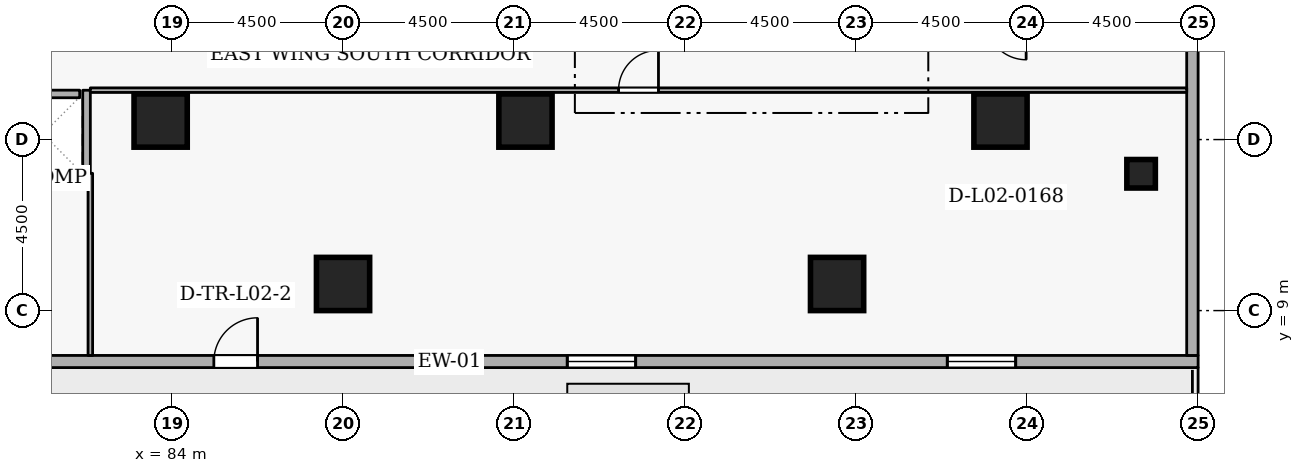
"""IFC4 building model, lengths in metres.
Left out: names, types, materials, properties, quantities, classifications, styles, units other than length and angle.
Written with IfcOpenShell. Run it as: python <this file> out.ifc"""

import sys

from ifc_helpers import new_model, si_unit, direction, frame, frame_2d, origin, origin_2d, place, context, subcontext, project, spatial, rectangle, extrude, element, fill, save


model = new_model("IFC4")
c1 = context("Model", 3, precision=1e-05, world=origin(), true_north=direction((0.0, 1.0)))
c2 = subcontext(c1, "Body", "Model", "MODEL_VIEW")
j1 = project(units=[si_unit("LENGTHUNIT", "METRE"), si_unit("PLANEANGLEUNIT", "RADIAN")], contexts=[c1])
p1 = place(None, origin())
s1 = spatial("IfcSite", under=j1, at=p1, CompositionType="ELEMENT")
p2 = place(p1, origin())
s2 = spatial("IfcBuilding", under=s1, at=p2, CompositionType="ELEMENT")
p3 = place(p2, frame((0.0, 0.0, 9.6)))
s3 = spatial("IfcBuildingStorey", under=s2, at=p3, CompositionType="ELEMENT", Elevation=9.6)
for number, where, z_axis, x_axis in (
    (1, (105.8, 14.0, 0.0), (0.0, 0.0, 1.0), (1.0, 0.0, 0.0)),
    (2, (101.5, 9.7, 0.0), (0.0, 0.0, 1.0), (1.0, 0.0, 0.0)),
    (3, (88.5, 9.7, 0.0), (0.0, 0.0, 1.0), (1.0, 0.0, 0.0)),
    (4, (93.3, 14.0, 0.0), (0.0, 0.0, 1.0), (1.0, 0.0, 0.0)),
    (5, (83.7, 14.0, 0.0), (0.0, 0.0, 1.0), (1.0, 0.0, 0.0)),
):
    element("IfcColumn", number, at=place(p3, frame(where, z_axis=z_axis, x_axis=x_axis)), inside=s3, PredefinedType="COLUMN", context=c2, shape_type="SweptSolid", body=[
        extrude(rectangle(XDim=1.4, YDim=1.4, at=origin_2d()), origin(), (0.0, 0.0, 1.0), 4.5),
    ])
p4 = place(p3, frame((109.5, 12.6, 0.0), z_axis=(0.0, 0.0, 1.0), x_axis=(1.0, 0.0, 0.0)))
e6 = element("IfcColumn", 6, at=p4, inside=s3, PredefinedType="COLUMN", context=c2, shape_type="SweptSolid", body=[
    extrude(rectangle(XDim=0.75, YDim=0.75, at=origin_2d()), origin(), (0.0, 0.0, 1.0), 4.5),
])
p5 = place(p3, frame((71.6, 7.66, 0.0), z_axis=(0.0, 0.0, 1.0), x_axis=(1.0, 0.0, 0.0)))
e7 = element("IfcWall", 7, at=p5, inside=s3, PredefinedType="STANDARD", context=c2, shape_type="SweptSolid", body=[
    extrude(rectangle(XDim=39.4, YDim=0.32, at=frame_2d((19.7, 0.0))), origin(), (0.0, 0.0, 1.0), 3.56),
])
p6 = place(p5, frame((13.5, 0.0, 0.0)))
e8 = element("IfcOpeningElement", 8, at=p6, cuts=e7, PredefinedType="OPENING", context=c2, shape_type="SweptSolid", body=[
    extrude(rectangle(XDim=1.15, YDim=2.1, at=frame_2d((0.575, 1.05))), frame((0.0, 0.17, 0.0), z_axis=(0.0, -1.0, 0.0), x_axis=(1.0, 0.0, 0.0)), (0.0, 0.0, 1.0), 0.34),
])
p7 = place(p5, frame((22.8, 0.0, 0.78)))
e9 = element("IfcOpeningElement", 9, at=p7, cuts=e7, PredefinedType="OPENING", context=c2, shape_type="SweptSolid", body=[
    extrude(rectangle(XDim=1.8, YDim=2.15, at=frame_2d((0.9, 1.075))), frame((0.0, 0.17, 0.0), z_axis=(0.0, -1.0, 0.0), x_axis=(1.0, 0.0, 0.0)), (0.0, 0.0, 1.0), 0.34),
])
p8 = place(p5, frame((32.8, 0.0, 0.78)))
e10 = element("IfcOpeningElement", 10, at=p8, cuts=e7, PredefinedType="OPENING", context=c2, shape_type="SweptSolid", body=[
    extrude(rectangle(XDim=1.8, YDim=2.15, at=frame_2d((0.9, 1.075))), frame((0.0, 0.17, 0.0), z_axis=(0.0, -1.0, 0.0), x_axis=(1.0, 0.0, 0.0)), (0.0, 0.0, 1.0), 0.34),
])
p9 = place(p3, frame((110.85, 7.82, 0.0), z_axis=(0.0, 0.0, 1.0), x_axis=(0.0, 1.0, 0.0)))
e11 = element("IfcWall", 11, at=p9, inside=s3, PredefinedType="STANDARD", context=c2, shape_type="SweptSolid", body=[
    extrude(rectangle(XDim=41.36, YDim=0.3, at=frame_2d((20.68, 0.0))), origin(), (0.0, 0.0, 1.0), 3.56),
])
p10 = place(p3, frame((79.63, 14.7, 0.0), z_axis=(0.0, 0.0, 1.0), x_axis=(1.0, 0.0, 0.0)))
e12 = element("IfcWall", 12, at=p10, inside=s3, PredefinedType="STANDARD", context=c2, shape_type="SweptSolid", body=[
    extrude(rectangle(XDim=1.94, YDim=0.2, at=frame_2d((0.97, 0.0))), origin(), (0.0, 0.0, 1.0), 4.16),
])
p11 = place(p3, frame((79.452, 12.5, 0.0), z_axis=(0.0, 0.0, 1.0), x_axis=(1.0, 0.0, 0.0)))
e13 = element("IfcWall", 13, at=p11, inside=s3, PredefinedType="STANDARD", context=c2, shape_type="SweptSolid", body=[
    extrude(rectangle(XDim=2.296, YDim=0.2, at=frame_2d((1.148, 0.0))), origin(), (0.0, 0.0, 1.0), 4.16),
])
p12 = place(p3, frame((81.75, 12.612, 0.0), z_axis=(0.0, 0.0, 1.0), x_axis=(0.0, 1.0, 0.0)))
e14 = element("IfcWall", 14, at=p12, inside=s3, PredefinedType="STANDARD", context=c2, shape_type="SweptSolid", body=[
    extrude(rectangle(XDim=2.186, YDim=0.2, at=frame_2d((1.093, 0.0))), origin(), (0.0, 0.0, 1.0), 4.16),
])
p13 = place(p3, frame((81.85, 7.82, 0.0), z_axis=(0.0, 0.0, 1.0), x_axis=(0.0, 1.0, 0.0)))
e15 = element("IfcWall", 15, at=p13, inside=s3, PredefinedType="PARTITIONING", context=c2, shape_type="SweptSolid", body=[
    extrude(rectangle(XDim=4.792, YDim=0.12, at=frame_2d((2.396, 0.0))), origin(), (0.0, 0.0, 1.0), 4.16),
])
p14 = place(p3, frame((81.85, 14.8, 0.0), z_axis=(0.0, 0.0, 1.0), x_axis=(1.0, 0.0, 0.0)))
e16 = element("IfcWall", 16, at=p14, inside=s3, PredefinedType="PARTITIONING", context=c2, shape_type="SweptSolid", body=[
    extrude(rectangle(XDim=28.85, YDim=0.12, at=frame_2d((14.425, 0.0))), origin(), (0.0, 0.0, 1.0), 4.16),
])
p15 = place(p14, frame((13.9, 0.0, 0.0)))
e17 = element("IfcOpeningElement", 17, at=p15, cuts=e16, PredefinedType="OPENING", context=c2, shape_type="SweptSolid", body=[
    extrude(rectangle(XDim=1.05, YDim=2.1, at=frame_2d((0.525, 1.05))), frame((0.0, 0.07, 0.0), z_axis=(0.0, -1.0, 0.0), x_axis=(1.0, 0.0, 0.0)), (0.0, 0.0, 1.0), 0.14),
])
p16 = place(p6, origin())
e18 = element("IfcDoor", 18, at=p16, inside=s3, OperationType="SINGLE_SWING_RIGHT", PredefinedType="DOOR", context=c2, shape_type="SweptSolid", body=[
    extrude(rectangle(XDim=1.15, YDim=2.1, at=frame_2d((0.575, 1.05))), frame((0.0, 0.025, 0.0), z_axis=(0.0, -1.0, 0.0), x_axis=(1.0, 0.0, 0.0)), (0.0, 0.0, 1.0), 0.05),
])
fill(e8, e18)
p17 = place(p7, origin())
e19 = element("IfcWindow", 19, at=p17, inside=s3, PartitioningType="SINGLE_PANEL", PredefinedType="WINDOW", context=c2, shape_type="SweptSolid", body=[
    extrude(rectangle(XDim=1.8, YDim=2.15, at=frame_2d((0.9, 1.075))), frame((0.0, 0.03, 0.0), z_axis=(0.0, -1.0, 0.0), x_axis=(1.0, 0.0, 0.0)), (0.0, 0.0, 1.0), 0.06),
])
fill(e9, e19)
p18 = place(p8, origin())
e20 = element("IfcWindow", 20, at=p18, inside=s3, PartitioningType="SINGLE_PANEL", PredefinedType="WINDOW", context=c2, shape_type="SweptSolid", body=[
    extrude(rectangle(XDim=1.8, YDim=2.15, at=frame_2d((0.9, 1.075))), frame((0.0, 0.03, 0.0), z_axis=(0.0, -1.0, 0.0), x_axis=(1.0, 0.0, 0.0)), (0.0, 0.0, 1.0), 0.06),
])
fill(e10, e20)
p19 = place(p15, origin())
e21 = element("IfcDoor", 21, at=p19, inside=s3, OperationType="SINGLE_SWING_RIGHT", PredefinedType="DOOR", context=c2, shape_type="SweptSolid", body=[
    extrude(rectangle(XDim=1.05, YDim=2.1, at=frame_2d((0.525, 1.05))), frame((0.0, 0.025, 0.0), z_axis=(0.0, -1.0, 0.0), x_axis=(1.0, 0.0, 0.0)), (0.0, 0.0, 1.0), 0.05),
])
fill(e17, e21)
save(model, sys.argv[1])
